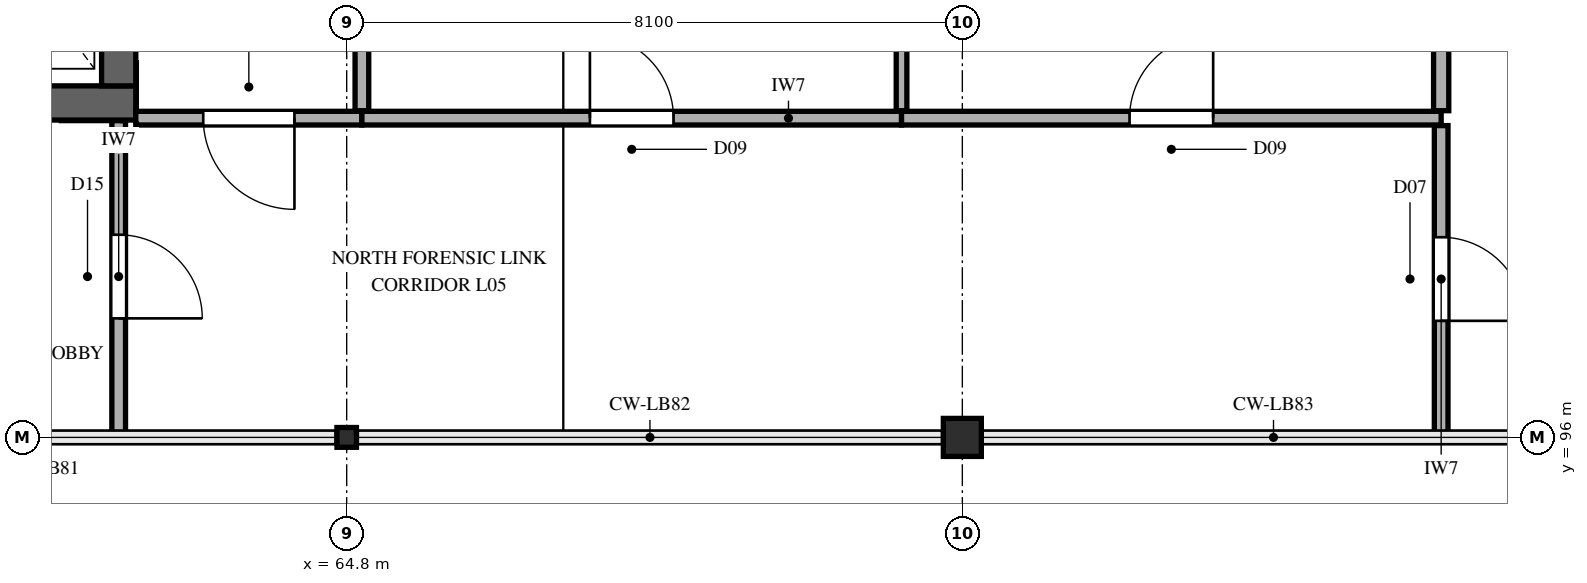
"""IFC4 building model, lengths in metres.
Left out: names, types, materials, properties, quantities, classifications, styles, units other than length and angle.
Written with IfcOpenShell. Run it as: python <this file> out.ifc"""

import sys

from ifc_helpers import new_model, si_unit, direction, frame, frame_2d, origin, origin_2d, place, context, subcontext, project, spatial, rectangle, i_section, extrude, element, fill, save


model = new_model("IFC4")
c1 = context("Model", 3, precision=1e-05, world=origin(), true_north=direction((0.0, 1.0)))
c2 = subcontext(c1, "Body", "Model", "MODEL_VIEW")
j1 = project(units=[si_unit("LENGTHUNIT", "METRE"), si_unit("PLANEANGLEUNIT", "RADIAN")], contexts=[c1])
p1 = place(None, origin())
s1 = spatial("IfcSite", under=j1, at=p1, CompositionType="ELEMENT")
p2 = place(p1, origin())
s2 = spatial("IfcBuilding", under=s1, at=p2, CompositionType="ELEMENT")
p3 = place(p2, frame((0.0, 0.0, 24.9)))
s3 = spatial("IfcBuildingStorey", under=s2, at=p3, CompositionType="ELEMENT", Elevation=24.9)
p4 = place(p3, frame((46.775, 100.4, 0.0), z_axis=(0.0, 0.0, 1.0), x_axis=(1.0, 0.0, 0.0)))
e1 = element("IfcWall", 1, at=p4, inside=s3, PredefinedType="SHEAR", context=c2, shape_type="SweptSolid", body=[
    extrude(rectangle(XDim=15.25, YDim=0.45, at=frame_2d((7.625, 0.0))), origin(), (0.0, 0.0, 1.0), 4.2),
])
p5 = place(p4, frame((0.975, 0.0, 0.0)))
e2 = element("IfcOpeningElement", 2, at=p5, cuts=e1, PredefinedType="OPENING", context=c2, shape_type="SweptSolid", body=[
    extrude(rectangle(XDim=1.15, YDim=2.25, at=frame_2d((0.575, 1.125))), frame((0.0, 0.235, 0.0), z_axis=(0.0, -1.0, 0.0), x_axis=(1.0, 0.0, 0.0)), (0.0, 0.0, 1.0), 0.47),
])
p6 = place(p4, frame((10.258, 0.0, 0.0)))
e3 = element("IfcOpeningElement", 3, at=p6, cuts=e1, PredefinedType="OPENING", context=c2, shape_type="SweptSolid", body=[
    extrude(rectangle(XDim=1.1, YDim=2.2, at=frame_2d((0.55, 1.1))), frame((0.0, 0.235, 0.0), z_axis=(0.0, -1.0, 0.0), x_axis=(1.0, 0.0, 0.0)), (0.0, 0.0, 1.0), 0.47),
])
p7 = place(p4, frame((12.972, 0.0, 0.0)))
e4 = element("IfcOpeningElement", 4, at=p7, cuts=e1, PredefinedType="OPENING", context=c2, shape_type="SweptSolid", body=[
    extrude(rectangle(XDim=1.1, YDim=2.2, at=frame_2d((0.55, 1.1))), frame((0.0, 0.235, 0.0), z_axis=(0.0, -1.0, 0.0), x_axis=(1.0, 0.0, 0.0)), (0.0, 0.0, 1.0), 0.47),
])
p8 = place(p3, frame((61.8, 100.625, 0.0), z_axis=(0.0, 0.0, 1.0), x_axis=(0.0, 1.0, 0.0)))
e5 = element("IfcWall", 5, at=p8, inside=s3, PredefinedType="SHEAR", context=c2, shape_type="SweptSolid", body=[
    extrude(rectangle(XDim=7.95, YDim=0.45, at=frame_2d((3.975, 0.0))), origin(), (0.0, 0.0, 1.0), 4.2),
])
p9 = place(p3, frame((64.8, 96.0, 0.0), z_axis=(0.0, 0.0, 1.0), x_axis=(1.0, 0.0, 0.0)))
e6 = element("IfcColumn", 6, at=p9, inside=s3, PredefinedType="COLUMN", context=c2, shape_type="SweptSolid", body=[
    extrude(i_section(OverallWidth=0.256, OverallDepth=0.26, WebThickness=0.011, FlangeThickness=0.017, FilletRadius=0.013, at=origin_2d()), origin(), (0.0, 0.0, 1.0), 4.2),
])
p10 = place(p3, frame((72.9, 96.0, 0.0), z_axis=(0.0, 0.0, 1.0), x_axis=(1.0, 0.0, 0.0)))
e7 = element("IfcColumn", 7, at=p10, inside=s3, PredefinedType="COLUMN", context=c2, shape_type="SweptSolid", body=[
    extrude(rectangle(XDim=0.5, YDim=0.5, at=origin_2d()), origin(), (0.0, 0.0, 1.0), 4.2),
])
p11 = place(p3, frame((62.025, 100.2, 0.0), z_axis=(0.0, 0.0, 1.0), x_axis=(1.0, 0.0, 0.0)))
e8 = element("IfcWall", 8, at=p11, inside=s3, PredefinedType="PARTITIONING", context=c2, shape_type="SweptSolid", body=[
    extrude(rectangle(XDim=2.975, YDim=0.18, at=frame_2d((1.488, 0.0))), origin(), (0.0, 0.0, 1.0), 3.96),
])
p12 = place(p11, frame((0.887, 0.0, 0.0)))
e9 = element("IfcOpeningElement", 9, at=p12, cuts=e8, PredefinedType="OPENING", context=c2, shape_type="SweptSolid", body=[
    extrude(rectangle(XDim=1.2, YDim=2.2, at=frame_2d((0.6, 1.1))), frame((0.0, 0.1, 0.0), z_axis=(0.0, -1.0, 0.0), x_axis=(1.0, 0.0, 0.0)), (0.0, 0.0, 1.0), 0.2),
])
p13 = place(p3, frame((65.0, 100.2, 0.0), z_axis=(0.0, 0.0, 1.0), x_axis=(1.0, 0.0, 0.0)))
e10 = element("IfcWall", 10, at=p13, inside=s3, PredefinedType="PARTITIONING", context=c2, shape_type="SweptSolid", body=[
    extrude(rectangle(XDim=7.1, YDim=0.18, at=frame_2d((3.55, 0.0))), origin(), (0.0, 0.0, 1.0), 3.96),
])
p14 = place(p13, frame((3.0, 0.0, 0.0)))
e11 = element("IfcOpeningElement", 11, at=p14, cuts=e10, PredefinedType="OPENING", context=c2, shape_type="SweptSolid", body=[
    extrude(rectangle(XDim=1.1, YDim=2.3, at=frame_2d((0.55, 1.15))), frame((0.0, 0.1, 0.0), z_axis=(0.0, -1.0, 0.0), x_axis=(1.0, 0.0, 0.0)), (0.0, 0.0, 1.0), 0.2),
])
p15 = place(p3, frame((72.1, 100.2, 0.0), z_axis=(0.0, 0.0, 1.0), x_axis=(1.0, 0.0, 0.0)))
e12 = element("IfcWall", 12, at=p15, inside=s3, PredefinedType="PARTITIONING", context=c2, shape_type="SweptSolid", body=[
    extrude(rectangle(XDim=7.1, YDim=0.18, at=frame_2d((3.55, 0.0))), origin(), (0.0, 0.0, 1.0), 3.96),
])
p16 = place(p15, frame((3.0, 0.0, 0.0)))
e13 = element("IfcOpeningElement", 13, at=p16, cuts=e12, PredefinedType="OPENING", context=c2, shape_type="SweptSolid", body=[
    extrude(rectangle(XDim=1.1, YDim=2.3, at=frame_2d((0.55, 1.15))), frame((0.0, 0.1, 0.0), z_axis=(0.0, -1.0, 0.0), x_axis=(1.0, 0.0, 0.0)), (0.0, 0.0, 1.0), 0.2),
])
p17 = place(p3, frame((61.8, 96.065, 0.0), z_axis=(0.0, 0.0, 1.0), x_axis=(0.0, 1.0, 0.0)))
e14 = element("IfcWall", 14, at=p17, inside=s3, PredefinedType="PARTITIONING", context=c2, shape_type="SweptSolid", body=[
    extrude(rectangle(XDim=4.102, YDim=0.18, at=frame_2d((2.051, 0.0))), origin(), (0.0, 0.0, 1.0), 3.96),
])
p18 = place(p17, frame((1.501, 0.0, 0.0)))
e15 = element("IfcOpeningElement", 15, at=p18, cuts=e14, PredefinedType="OPENING", context=c2, shape_type="SweptSolid", body=[
    extrude(rectangle(XDim=1.1, YDim=2.2, at=frame_2d((0.55, 1.1))), frame((0.0, 0.1, 0.0), z_axis=(0.0, -1.0, 0.0), x_axis=(1.0, 0.0, 0.0)), (0.0, 0.0, 1.0), 0.2),
])
p19 = place(p3, frame((65.0, 100.298, 0.0), z_axis=(0.0, 0.0, 1.0), x_axis=(0.0, 1.0, 0.0)))
e16 = element("IfcWall", 16, at=p19, inside=s3, PredefinedType="PARTITIONING", context=c2, shape_type="SweptSolid", body=[
    extrude(rectangle(XDim=5.782, YDim=0.18, at=frame_2d((2.891, 0.0))), origin(), (0.0, 0.0, 1.0), 3.452),
])
p20 = place(p3, frame((72.1, 100.298, 0.0), z_axis=(0.0, 0.0, 1.0), x_axis=(0.0, 1.0, 0.0)))
e17 = element("IfcWall", 17, at=p20, inside=s3, PredefinedType="PARTITIONING", context=c2, shape_type="SweptSolid", body=[
    extrude(rectangle(XDim=5.782, YDim=0.14, at=frame_2d((2.891, 0.0))), origin(), (0.0, 0.0, 1.0), 3.96),
])
p21 = place(p3, frame((79.2, 96.065, 0.0), z_axis=(0.0, 0.0, 1.0), x_axis=(0.0, 1.0, 0.0)))
e18 = element("IfcWall", 18, at=p21, inside=s3, PredefinedType="PARTITIONING", context=c2, shape_type="SweptSolid", body=[
    extrude(rectangle(XDim=4.037, YDim=0.18, at=frame_2d((2.019, 0.0))), origin(), (0.0, 0.0, 1.0), 3.96),
])
p22 = place(p21, frame((1.469, 0.0, 0.0)))
e19 = element("IfcOpeningElement", 19, at=p22, cuts=e18, PredefinedType="OPENING", context=c2, shape_type="SweptSolid", body=[
    extrude(rectangle(XDim=1.1, YDim=2.2, at=frame_2d((0.55, 1.1))), frame((0.0, 0.1, 0.0), z_axis=(0.0, -1.0, 0.0), x_axis=(1.0, 0.0, 0.0)), (0.0, 0.0, 1.0), 0.2),
])
p23 = place(p3, frame((79.2, 100.298, 0.0), z_axis=(0.0, 0.0, 1.0), x_axis=(0.0, 1.0, 0.0)))
e20 = element("IfcWall", 20, at=p23, inside=s3, PredefinedType="PARTITIONING", context=c2, shape_type="SweptSolid", body=[
    extrude(rectangle(XDim=5.782, YDim=0.2, at=frame_2d((2.891, 0.0))), origin(), (0.0, 0.0, 1.0), 3.96),
])
p24 = place(p12, frame((1.2, 0.0, 0.0), z_axis=(0.0, 0.0, 1.0), x_axis=(-1.0, 0.0, 0.0)))
e21 = element("IfcDoor", 21, at=p24, inside=s3, OperationType="SINGLE_SWING_RIGHT", PredefinedType="DOOR", context=c2, shape_type="SweptSolid", body=[
    extrude(rectangle(XDim=1.2, YDim=2.2, at=frame_2d((0.6, 1.1))), frame((0.0, 0.025, 0.0), z_axis=(0.0, -1.0, 0.0), x_axis=(1.0, 0.0, 0.0)), (0.0, 0.0, 1.0), 0.05),
])
fill(e9, e21)
p25 = place(p14, origin())
e22 = element("IfcDoor", 22, at=p25, inside=s3, OperationType="SINGLE_SWING_LEFT", PredefinedType="DOOR", context=c2, shape_type="SweptSolid", body=[
    extrude(rectangle(XDim=1.1, YDim=2.3, at=frame_2d((0.55, 1.15))), frame((0.0, 0.025, 0.0), z_axis=(0.0, -1.0, 0.0), x_axis=(1.0, 0.0, 0.0)), (0.0, 0.0, 1.0), 0.05),
])
fill(e11, e22)
p26 = place(p16, origin())
e23 = element("IfcDoor", 23, at=p26, inside=s3, OperationType="SINGLE_SWING_RIGHT", PredefinedType="DOOR", context=c2, shape_type="SweptSolid", body=[
    extrude(rectangle(XDim=1.1, YDim=2.3, at=frame_2d((0.55, 1.15))), frame((0.0, 0.025, 0.0), z_axis=(0.0, -1.0, 0.0), x_axis=(1.0, 0.0, 0.0)), (0.0, 0.0, 1.0), 0.05),
])
fill(e13, e23)
p27 = place(p18, frame((1.1, 0.0, 0.0), z_axis=(0.0, 0.0, 1.0), x_axis=(-1.0, 0.0, 0.0)))
e24 = element("IfcDoor", 24, at=p27, inside=s3, OperationType="SINGLE_SWING_LEFT", PredefinedType="DOOR", context=c2, shape_type="SweptSolid", body=[
    extrude(rectangle(XDim=1.1, YDim=2.2, at=frame_2d((0.55, 1.1))), frame((0.0, 0.025, 0.0), z_axis=(0.0, -1.0, 0.0), x_axis=(1.0, 0.0, 0.0)), (0.0, 0.0, 1.0), 0.05),
])
fill(e15, e24)
p28 = place(p22, frame((1.1, 0.0, 0.0), z_axis=(0.0, 0.0, 1.0), x_axis=(-1.0, 0.0, 0.0)))
e25 = element("IfcDoor", 25, at=p28, inside=s3, OperationType="SINGLE_SWING_LEFT", PredefinedType="DOOR", context=c2, shape_type="SweptSolid", body=[
    extrude(rectangle(XDim=1.1, YDim=2.2, at=frame_2d((0.55, 1.1))), frame((0.0, 0.025, 0.0), z_axis=(0.0, -1.0, 0.0), x_axis=(1.0, 0.0, 0.0)), (0.0, 0.0, 1.0), 0.05),
])
fill(e19, e25)
save(model, sys.argv[1])
